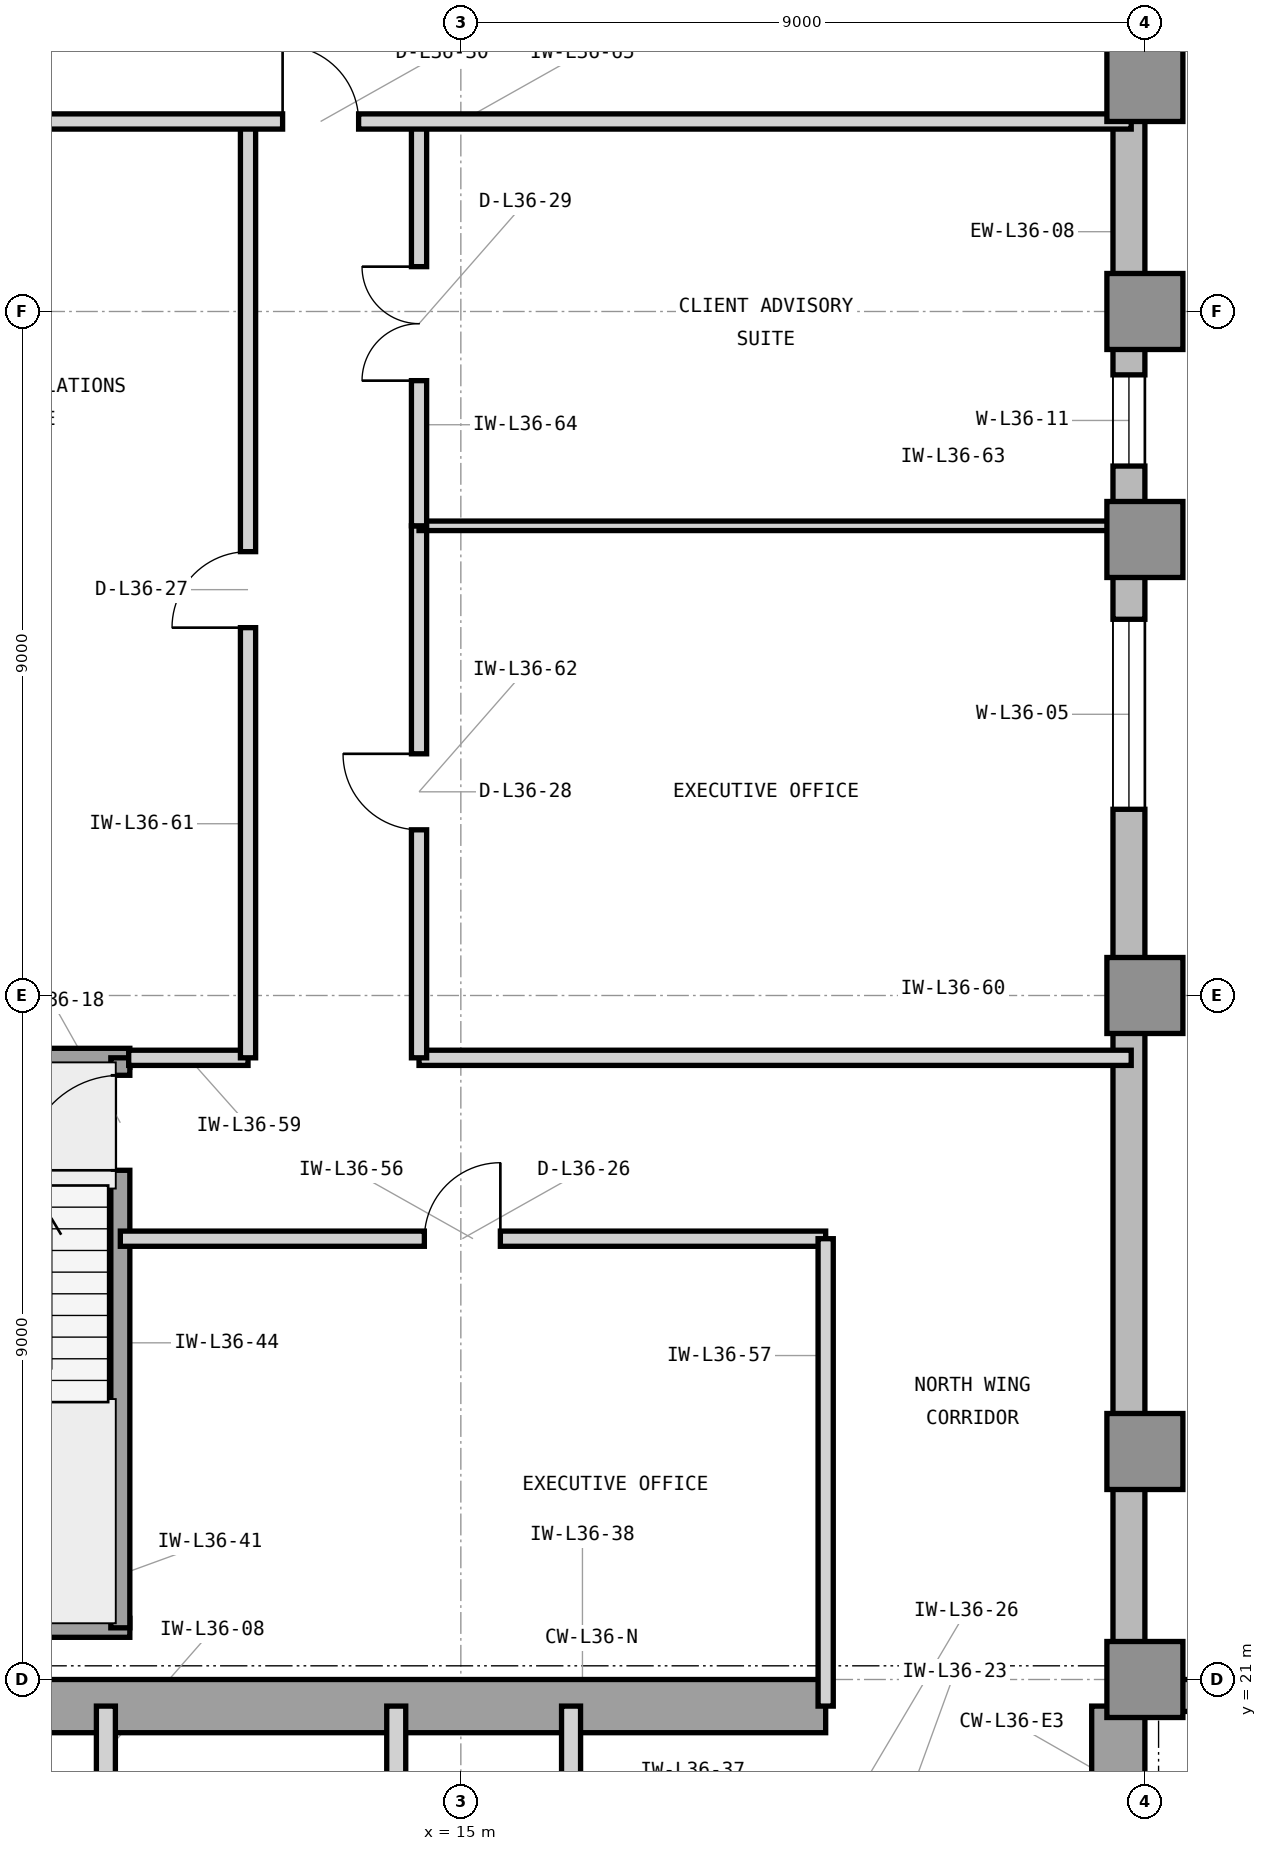
"""IFC4 building model, lengths in metres.
Left out: names, types, materials, properties, quantities, classifications, styles, units other than length and angle.
Written with IfcOpenShell. Run it as: python <this file> out.ifc"""

import sys

from ifc_helpers import new_model, si_unit, direction, frame, frame_2d, origin, origin_2d, place, context, subcontext, project, spatial, rectangle, extrude, element, fill, save


model = new_model("IFC4")
c1 = context("Model", 3, precision=1e-05, world=origin(), true_north=direction((0.0, 1.0)))
c2 = subcontext(c1, "Body", "Model", "MODEL_VIEW")
j1 = project(units=[si_unit("LENGTHUNIT", "METRE"), si_unit("PLANEANGLEUNIT", "RADIAN")], contexts=[c1])
p1 = place(None, origin())
s1 = spatial("IfcSite", under=j1, at=p1, CompositionType="ELEMENT")
p2 = place(p1, origin())
s2 = spatial("IfcBuilding", under=s1, at=p2, CompositionType="ELEMENT")
p3 = place(p2, frame((0.0, 0.0, 151.8)))
s3 = spatial("IfcBuildingStorey", under=s2, at=p3, CompositionType="ELEMENT", Elevation=151.8)
p4 = place(p3, frame((7.475, 20.65, 0.0), z_axis=(0.0, 0.0, 1.0), x_axis=(1.0, 0.0, 0.0)))
e1 = element("IfcWall", 1, at=p4, inside=s3, PredefinedType="SHEAR", context=c2, shape_type="SweptSolid", body=[
    extrude(rectangle(XDim=12.325, YDim=0.7, at=frame_2d((6.163, 0.0))), origin(), (0.0, 0.0, 1.0), 3.9),
])
p5 = place(p3, frame((23.65, 16.6, 0.0), z_axis=(0.0, 0.0, 1.0), x_axis=(0.0, 1.0, 0.0)))
e2 = element("IfcWall", 2, at=p5, inside=s3, PredefinedType="SHEAR", context=c2, shape_type="SweptSolid", body=[
    extrude(rectangle(XDim=4.05, YDim=0.7, at=frame_2d((2.025, 0.0))), origin(), (0.0, 0.0, 1.0), 3.9),
])
for number, where, z_axis, x_axis in (
    (3, (24.0, 21.0, 0.0), (0.0, 0.0, 1.0), (1.0, 0.0, 0.0)),
    (4, (24.0, 24.0, 0.0), (0.0, 0.0, 1.0), (1.0, 0.0, 0.0)),
    (5, (24.0, 30.0, 0.0), (0.0, 0.0, 1.0), (1.0, 0.0, 0.0)),
    (6, (24.0, 36.0, 0.0), (0.0, 0.0, 1.0), (1.0, 0.0, 0.0)),
    (7, (24.0, 39.0, 0.0), (0.0, 0.0, 1.0), (1.0, 0.0, 0.0)),
    (8, (24.0, 42.0, 0.0), (0.0, 0.0, 1.0), (1.0, 0.0, 0.0)),
):
    element("IfcColumn", number, at=place(p3, frame(where, z_axis=z_axis, x_axis=x_axis)), inside=s3, PredefinedType="COLUMN", context=c2, shape_type="SweptSolid", body=[
        extrude(rectangle(XDim=1.0, YDim=1.0, at=origin_2d()), origin(), (0.0, 0.0, 1.0), 3.9),
    ])
p6 = place(p3, frame((58.4, 20.79, 0.0), z_axis=(0.0, 0.0, 1.0), x_axis=(-1.0, 0.0, 0.0)))
e9 = element("IfcWall", 9, at=p6, inside=s3, PredefinedType="STANDARD", context=c2, shape_type="SweptSolid", body=[
    extrude(rectangle(XDim=34.4, YDim=0.42, at=frame_2d((17.2, 0.0))), origin(), (0.0, 0.0, 1.0), 3.62),
])
p7 = place(p6, frame((20.864, 0.0, 0.85)))
e10 = element("IfcOpeningElement", 10, at=p7, cuts=e9, PredefinedType="OPENING", context=c2, shape_type="SweptSolid", body=[
    extrude(rectangle(XDim=2.5, YDim=2.25, at=frame_2d((1.25, 1.125))), frame((0.0, 0.22, 0.0), z_axis=(0.0, -1.0, 0.0), x_axis=(1.0, 0.0, 0.0)), (0.0, 0.0, 1.0), 0.44),
])
p8 = place(p6, frame((32.222, 0.0, 0.85)))
e11 = element("IfcOpeningElement", 11, at=p8, cuts=e9, PredefinedType="OPENING", context=c2, shape_type="SweptSolid", body=[
    extrude(rectangle(XDim=1.2, YDim=2.25, at=frame_2d((0.6, 1.125))), frame((0.0, 0.22, 0.0), z_axis=(0.0, -1.0, 0.0), x_axis=(1.0, 0.0, 0.0)), (0.0, 0.0, 1.0), 0.44),
])
p9 = place(p6, frame((11.386, 0.0, 0.85)))
e12 = element("IfcOpeningElement", 12, at=p9, cuts=e9, PredefinedType="OPENING", context=c2, shape_type="SweptSolid", body=[
    extrude(rectangle(XDim=2.5, YDim=2.25, at=frame_2d((1.25, 1.125))), frame((0.0, 0.22, 0.0), z_axis=(0.0, -1.0, 0.0), x_axis=(1.0, 0.0, 0.0)), (0.0, 0.0, 1.0), 0.44),
])
p10 = place(p3, frame((23.79, 21.0, 0.0), z_axis=(0.0, 0.0, 1.0), x_axis=(0.0, 1.0, 0.0)))
e13 = element("IfcWall", 13, at=p10, inside=s3, PredefinedType="STANDARD", context=c2, shape_type="SweptSolid", body=[
    extrude(rectangle(XDim=25.4, YDim=0.42, at=frame_2d((12.7, 0.0))), origin(), (0.0, 0.0, 1.0), 3.62),
])
p11 = place(p10, frame((11.45, 0.0, 0.85)))
e14 = element("IfcOpeningElement", 14, at=p11, cuts=e13, PredefinedType="OPENING", context=c2, shape_type="SweptSolid", body=[
    extrude(rectangle(XDim=2.5, YDim=2.25, at=frame_2d((1.25, 1.125))), frame((0.0, 0.22, 0.0), z_axis=(0.0, -1.0, 0.0), x_axis=(1.0, 0.0, 0.0)), (0.0, 0.0, 1.0), 0.44),
])
p12 = place(p10, frame((15.966, 0.0, 0.85)))
e15 = element("IfcOpeningElement", 15, at=p12, cuts=e13, PredefinedType="OPENING", context=c2, shape_type="SweptSolid", body=[
    extrude(rectangle(XDim=1.2, YDim=2.25, at=frame_2d((0.6, 1.125))), frame((0.0, 0.22, 0.0), z_axis=(0.0, -1.0, 0.0), x_axis=(1.0, 0.0, 0.0)), (0.0, 0.0, 1.0), 0.44),
])
p13 = place(p3, frame((10.33, 19.45, 0.0), z_axis=(0.0, 0.0, 1.0), x_axis=(0.0, 1.0, 0.0)))
e16 = element("IfcWall", 16, at=p13, inside=s3, PredefinedType="PARTITIONING", context=c2, shape_type="SweptSolid", body=[
    extrude(rectangle(XDim=1.2, YDim=0.25, at=frame_2d((0.6, 0.0))), origin(), (0.0, 0.0, 1.0), 2.754),
])
for number, where, z_axis, x_axis in (
    (17, (14.15, 16.7, 0.0), (0.0, 0.0, 1.0), (0.0, 1.0, 0.0)),
    (18, (16.45, 16.7, 0.0), (0.0, 0.0, 1.0), (0.0, 1.0, 0.0)),
):
    element("IfcWall", number, at=place(p3, frame(where, z_axis=z_axis, x_axis=x_axis)), inside=s3, PredefinedType="PARTITIONING", context=c2, shape_type="SweptSolid", body=[
        extrude(rectangle(XDim=3.95, YDim=0.25, at=frame_2d((1.975, 0.0))), origin(), (0.0, 0.0, 1.0), 3.61),
    ])
for number, where, z_axis, x_axis in (
    (19, (6.555, 21.68, 0.0), (0.0, 0.0, 1.0), (1.0, 0.0, 0.0)),
    (20, (6.555, 29.18, 0.0), (0.0, 0.0, 1.0), (1.0, 0.0, 0.0)),
):
    element("IfcWall", number, at=place(p3, frame(where, z_axis=z_axis, x_axis=x_axis)), inside=s3, PredefinedType="SHEAR", context=c2, shape_type="SweptSolid", body=[
        extrude(rectangle(XDim=4.09, YDim=0.25, at=frame_2d((2.045, 0.0))), origin(), (0.0, 0.0, 1.0), 3.9),
    ])
p14 = place(p3, frame((10.52, 21.68, 0.0), z_axis=(0.0, 0.0, 1.0), x_axis=(0.0, 1.0, 0.0)))
e21 = element("IfcWall", 21, at=p14, inside=s3, PredefinedType="SHEAR", context=c2, shape_type="SweptSolid", body=[
    extrude(rectangle(XDim=7.5, YDim=0.25, at=frame_2d((3.75, 0.0))), origin(), (0.0, 0.0, 1.0), 3.9),
])
p15 = place(p14, frame((6.02, 0.0, 0.0)))
e22 = element("IfcOpeningElement", 22, at=p15, cuts=e21, PredefinedType="OPENING", context=c2, shape_type="SweptSolid", body=[
    extrude(rectangle(XDim=1.25, YDim=2.2, at=frame_2d((0.625, 1.1))), frame((0.0, 0.135, 0.0), z_axis=(0.0, -1.0, 0.0), x_axis=(1.0, 0.0, 0.0)), (0.0, 0.0, 1.0), 0.27),
])
p16 = place(p3, frame((10.52, 26.8, 0.0), z_axis=(0.0, 0.0, 1.0), x_axis=(1.0, 0.0, 0.0)))
e23 = element("IfcWall", 23, at=p16, inside=s3, PredefinedType="PARTITIONING", context=c2, shape_type="SweptSolid", body=[
    extrude(rectangle(XDim=9.28, YDim=0.2, at=frame_2d((4.64, 0.0))), origin(), (0.0, 0.0, 1.0), 3.61),
])
p17 = place(p16, frame((4.0, 0.0, 0.0)))
e24 = element("IfcOpeningElement", 24, at=p17, cuts=e23, PredefinedType="OPENING", context=c2, shape_type="SweptSolid", body=[
    extrude(rectangle(XDim=1.0, YDim=2.15, at=frame_2d((0.5, 1.075))), frame((0.0, 0.11, 0.0), z_axis=(0.0, -1.0, 0.0), x_axis=(1.0, 0.0, 0.0)), (0.0, 0.0, 1.0), 0.22),
])
p18 = place(p3, frame((19.8, 20.65, 0.0), z_axis=(0.0, 0.0, 1.0), x_axis=(0.0, 1.0, 0.0)))
e25 = element("IfcWall", 25, at=p18, inside=s3, PredefinedType="PARTITIONING", context=c2, shape_type="SweptSolid", body=[
    extrude(rectangle(XDim=6.15, YDim=0.2, at=frame_2d((3.075, 0.0))), origin(), (0.0, 0.0, 1.0), 3.61),
])
p19 = place(p3, frame((10.63, 29.18, 0.0), z_axis=(0.0, 0.0, 1.0), x_axis=(1.0, 0.0, 0.0)))
e26 = element("IfcWall", 26, at=p19, inside=s3, PredefinedType="PARTITIONING", context=c2, shape_type="SweptSolid", body=[
    extrude(rectangle(XDim=1.57, YDim=0.2, at=frame_2d((0.785, 0.0))), origin(), (0.0, 0.0, 1.0), 3.61),
])
p20 = place(p3, frame((14.45, 29.18, 0.0), z_axis=(0.0, 0.0, 1.0), x_axis=(1.0, 0.0, 0.0)))
e27 = element("IfcWall", 27, at=p20, inside=s3, PredefinedType="PARTITIONING", context=c2, shape_type="SweptSolid", body=[
    extrude(rectangle(XDim=9.37, YDim=0.2, at=frame_2d((4.685, 0.0))), origin(), (0.0, 0.0, 1.0), 3.61),
])
p21 = place(p3, frame((12.2, 29.18, 0.0), z_axis=(0.0, 0.0, 1.0), x_axis=(0.0, 1.0, 0.0)))
e28 = element("IfcWall", 28, at=p21, inside=s3, PredefinedType="PARTITIONING", context=c2, shape_type="SweptSolid", body=[
    extrude(rectangle(XDim=12.32, YDim=0.2, at=frame_2d((6.16, 0.0))), origin(), (0.0, 0.0, 1.0), 3.61),
])
p22 = place(p21, frame((5.66, 0.0, 0.0)))
e29 = element("IfcOpeningElement", 29, at=p22, cuts=e28, PredefinedType="OPENING", context=c2, shape_type="SweptSolid", body=[
    extrude(rectangle(XDim=1.0, YDim=2.15, at=frame_2d((0.5, 1.075))), frame((0.0, 0.11, 0.0), z_axis=(0.0, -1.0, 0.0), x_axis=(1.0, 0.0, 0.0)), (0.0, 0.0, 1.0), 0.22),
])
p23 = place(p3, frame((14.45, 29.18, 0.0), z_axis=(0.0, 0.0, 1.0), x_axis=(0.0, 1.0, 0.0)))
e30 = element("IfcWall", 30, at=p23, inside=s3, PredefinedType="PARTITIONING", context=c2, shape_type="SweptSolid", body=[
    extrude(rectangle(XDim=7.0, YDim=0.2, at=frame_2d((3.5, 0.0))), origin(), (0.0, 0.0, 1.0), 3.61),
])
p24 = place(p23, frame((3.0, 0.0, 0.0)))
e31 = element("IfcOpeningElement", 31, at=p24, cuts=e30, PredefinedType="OPENING", context=c2, shape_type="SweptSolid", body=[
    extrude(rectangle(XDim=1.0, YDim=2.15, at=frame_2d((0.5, 1.075))), frame((0.0, 0.11, 0.0), z_axis=(0.0, -1.0, 0.0), x_axis=(1.0, 0.0, 0.0)), (0.0, 0.0, 1.0), 0.22),
])
p25 = place(p3, frame((14.45, 36.18, 0.0), z_axis=(0.0, 0.0, 1.0), x_axis=(1.0, 0.0, 0.0)))
e32 = element("IfcWall", 32, at=p25, inside=s3, PredefinedType="PARTITIONING", context=c2, shape_type="SweptSolid", body=[
    extrude(rectangle(XDim=9.37, YDim=0.125, at=frame_2d((4.685, 0.0))), origin(), (0.0, 0.0, 1.0), 2.754),
])
p26 = place(p3, frame((14.45, 36.18, 0.0), z_axis=(0.0, 0.0, 1.0), x_axis=(0.0, 1.0, 0.0)))
e33 = element("IfcWall", 33, at=p26, inside=s3, PredefinedType="PARTITIONING", context=c2, shape_type="SweptSolid", body=[
    extrude(rectangle(XDim=5.32, YDim=0.2, at=frame_2d((2.66, 0.0))), origin(), (0.0, 0.0, 1.0), 3.61),
])
p27 = place(p26, frame((1.91, 0.0, 0.0)))
e34 = element("IfcOpeningElement", 34, at=p27, cuts=e33, PredefinedType="OPENING", context=c2, shape_type="SweptSolid", body=[
    extrude(rectangle(XDim=1.5, YDim=2.3, at=frame_2d((0.75, 1.15))), frame((0.0, 0.11, 0.0), z_axis=(0.0, -1.0, 0.0), x_axis=(1.0, 0.0, 0.0)), (0.0, 0.0, 1.0), 0.22),
])
p28 = place(p3, frame((6.18, 41.5, 0.0), z_axis=(0.0, 0.0, 1.0), x_axis=(1.0, 0.0, 0.0)))
e35 = element("IfcWall", 35, at=p28, inside=s3, PredefinedType="PARTITIONING", context=c2, shape_type="SweptSolid", body=[
    extrude(rectangle(XDim=17.64, YDim=0.2, at=frame_2d((8.82, 0.0))), origin(), (0.0, 0.0, 1.0), 3.61),
])
p29 = place(p28, frame((6.475, 0.0, 0.0)))
e36 = element("IfcOpeningElement", 36, at=p29, cuts=e35, PredefinedType="OPENING", context=c2, shape_type="SweptSolid", body=[
    extrude(rectangle(XDim=1.0, YDim=2.15, at=frame_2d((0.5, 1.075))), frame((0.0, 0.11, 0.0), z_axis=(0.0, -1.0, 0.0), x_axis=(1.0, 0.0, 0.0)), (0.0, 0.0, 1.0), 0.22),
])
p30 = place(p11, origin())
e37 = element("IfcWindow", 37, at=p30, inside=s3, PartitioningType="SINGLE_PANEL", PredefinedType="WINDOW", context=c2, shape_type="SweptSolid", body=[
    extrude(rectangle(XDim=2.5, YDim=2.25, at=frame_2d((1.25, 1.125))), frame((0.0, 0.11, 0.0), z_axis=(0.0, -1.0, 0.0), x_axis=(1.0, 0.0, 0.0)), (0.0, 0.0, 1.0), 0.06),
])
fill(e14, e37)
p31 = place(p15, origin())
e38 = element("IfcDoor", 38, at=p31, inside=s3, OperationType="SINGLE_SWING_LEFT", PredefinedType="DOOR", context=c2, shape_type="SweptSolid", body=[
    extrude(rectangle(XDim=1.25, YDim=2.2, at=frame_2d((0.625, 1.1))), frame((0.0, 0.025, 0.0), z_axis=(0.0, -1.0, 0.0), x_axis=(1.0, 0.0, 0.0)), (0.0, 0.0, 1.0), 0.05),
])
fill(e22, e38)
p32 = place(p17, origin())
e39 = element("IfcDoor", 39, at=p32, inside=s3, OperationType="SINGLE_SWING_RIGHT", PredefinedType="DOOR", context=c2, shape_type="SweptSolid", body=[
    extrude(rectangle(XDim=1.0, YDim=2.15, at=frame_2d((0.5, 1.075))), frame((0.0, 0.025, 0.0), z_axis=(0.0, -1.0, 0.0), x_axis=(1.0, 0.0, 0.0)), (0.0, 0.0, 1.0), 0.05),
])
fill(e24, e39)
p33 = place(p22, origin())
e40 = element("IfcDoor", 40, at=p33, inside=s3, OperationType="SINGLE_SWING_LEFT", PredefinedType="DOOR", context=c2, shape_type="SweptSolid", body=[
    extrude(rectangle(XDim=1.0, YDim=2.15, at=frame_2d((0.5, 1.075))), frame((0.0, 0.025, 0.0), z_axis=(0.0, -1.0, 0.0), x_axis=(1.0, 0.0, 0.0)), (0.0, 0.0, 1.0), 0.05),
])
fill(e29, e40)
p34 = place(p24, origin())
e41 = element("IfcDoor", 41, at=p34, inside=s3, OperationType="SINGLE_SWING_RIGHT", PredefinedType="DOOR", context=c2, shape_type="SweptSolid", body=[
    extrude(rectangle(XDim=1.0, YDim=2.15, at=frame_2d((0.5, 1.075))), frame((0.0, 0.025, 0.0), z_axis=(0.0, -1.0, 0.0), x_axis=(1.0, 0.0, 0.0)), (0.0, 0.0, 1.0), 0.05),
])
fill(e31, e41)
p35 = place(p27, origin())
e42 = element("IfcDoor", 42, at=p35, inside=s3, OperationType="DOUBLE_DOOR_SINGLE_SWING", PredefinedType="DOOR", context=c2, shape_type="SweptSolid", body=[
    extrude(rectangle(XDim=1.5, YDim=2.3, at=frame_2d((0.75, 1.15))), frame((0.0, 0.025, 0.0), z_axis=(0.0, -1.0, 0.0), x_axis=(1.0, 0.0, 0.0)), (0.0, 0.0, 1.0), 0.05),
])
fill(e34, e42)
p36 = place(p29, origin())
e43 = element("IfcDoor", 43, at=p36, inside=s3, OperationType="SINGLE_SWING_LEFT", PredefinedType="DOOR", context=c2, shape_type="SweptSolid", body=[
    extrude(rectangle(XDim=1.0, YDim=2.15, at=frame_2d((0.5, 1.075))), frame((0.0, 0.025, 0.0), z_axis=(0.0, -1.0, 0.0), x_axis=(1.0, 0.0, 0.0)), (0.0, 0.0, 1.0), 0.05),
])
fill(e36, e43)
p37 = place(p12, origin())
e44 = element("IfcWindow", 44, at=p37, inside=s3, PartitioningType="SINGLE_PANEL", PredefinedType="WINDOW", context=c2, shape_type="SweptSolid", body=[
    extrude(rectangle(XDim=1.2, YDim=2.25, at=frame_2d((0.6, 1.125))), frame((0.0, 0.11, 0.0), z_axis=(0.0, -1.0, 0.0), x_axis=(1.0, 0.0, 0.0)), (0.0, 0.0, 1.0), 0.06),
])
fill(e15, e44)
save(model, sys.argv[1])
